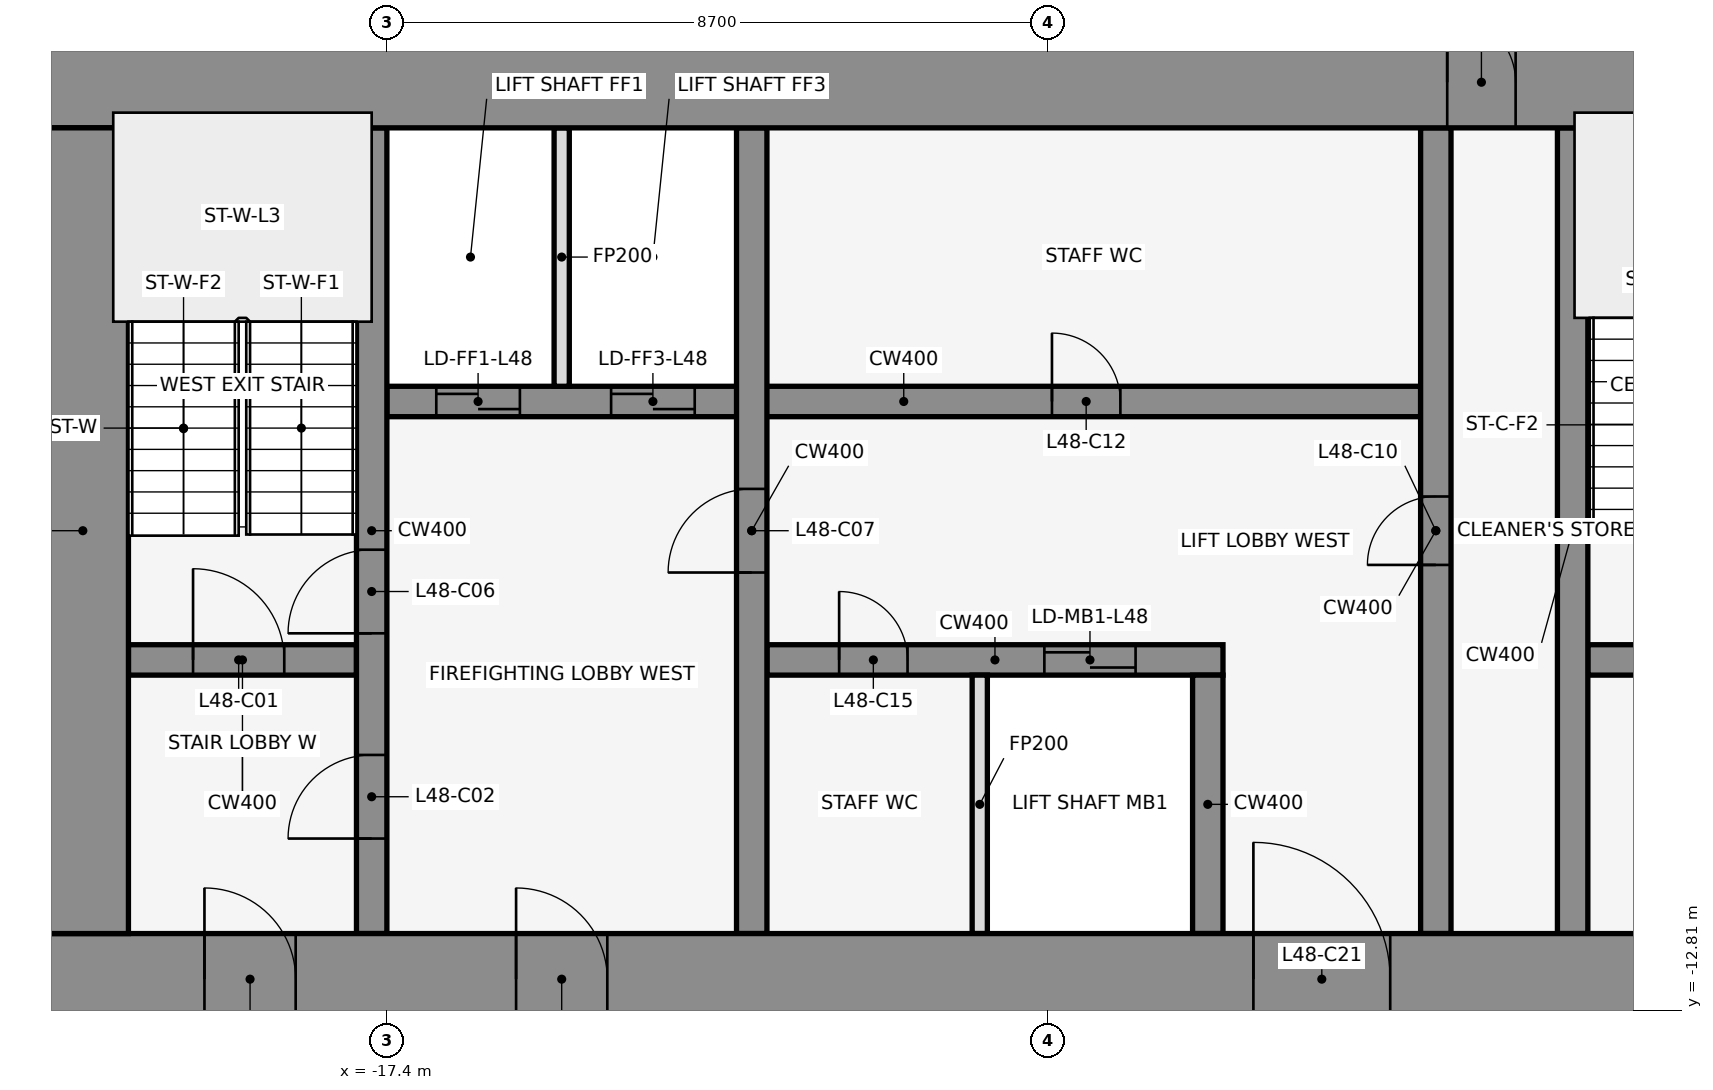
"""IFC4 building model, lengths in metres.
Left out: names, types, materials, properties, quantities, classifications, styles, units other than length and angle.
Written with IfcOpenShell. Run it as: python <this file> out.ifc"""

import sys

from ifc_helpers import new_model, si_unit, direction, frame, frame_2d, origin, place, context, subcontext, project, spatial, rectangle, extrude, element, fill, save


model = new_model("IFC4")
c1 = context("Model", 3, precision=1e-05, world=origin(), true_north=direction((0.0, 1.0)))
c2 = subcontext(c1, "Body", "Model", "MODEL_VIEW")
j1 = project(units=[si_unit("LENGTHUNIT", "METRE"), si_unit("PLANEANGLEUNIT", "RADIAN")], contexts=[c1])
p1 = place(None, origin())
s1 = spatial("IfcSite", under=j1, at=p1, CompositionType="ELEMENT")
p2 = place(p1, origin())
s2 = spatial("IfcBuilding", under=s1, at=p2, CompositionType="ELEMENT")
p3 = place(p2, frame((0.0, 0.0, 215.5)))
s3 = spatial("IfcBuildingStorey", under=s2, at=p3, CompositionType="ELEMENT", Elevation=215.5)
for number, where, z_axis, x_axis in (
    (1, (-0.068, -0.105, 0.0), (0.0, 0.0, 1.0), (-0.84, 0.543, 0.0)),
    (2, (-14.599, 1.08, 0.0), (0.0, 0.0, 1.0), (-0.84, -0.543, 0.0)),
):
    element("IfcWall", number, at=place(p3, frame(where, z_axis=z_axis, x_axis=x_axis)), inside=s3, PredefinedType="STANDARD", context=c2, shape_type="SweptSolid", body=[
        extrude(rectangle(XDim=2.183, YDim=0.25, at=frame_2d((1.091, 0.0))), origin(), (0.0, 0.0, 1.0), 3.95),
    ])
p4 = place(p3, frame((-20.8, -8.2, 0.0), z_axis=(0.0, 0.0, 1.0), x_axis=(1.0, 0.0, 0.0)))
e3 = element("IfcWall", 3, at=p4, inside=s3, PredefinedType="SHEAR", context=c2, shape_type="SweptSolid", body=[
    extrude(rectangle(XDim=3.0, YDim=0.4, at=frame_2d((1.5, 0.0))), origin(), (0.0, 0.0, 1.0), 4.1),
])
p5 = place(p4, frame((0.85, 0.0, 0.0)))
e4 = element("IfcOpeningElement", 4, at=p5, cuts=e3, PredefinedType="OPENING", context=c2, shape_type="SweptSolid", body=[
    extrude(rectangle(XDim=1.2, YDim=2.1, at=frame_2d((0.6, 1.05))), frame((0.0, 0.212, 0.0), z_axis=(0.0, -1.0, 0.0), x_axis=(1.0, 0.0, 0.0)), (0.0, 0.0, 1.0), 0.424),
])
p6 = place(p3, frame((-12.4, -8.2, 0.0), z_axis=(0.0, 0.0, 1.0), x_axis=(1.0, 0.0, 0.0)))
e5 = element("IfcWall", 5, at=p6, inside=s3, PredefinedType="SHEAR", context=c2, shape_type="SweptSolid", body=[
    extrude(rectangle(XDim=6.0, YDim=0.4, at=frame_2d((3.0, 0.0))), origin(), (0.0, 0.0, 1.0), 4.1),
])
p7 = place(p6, frame((3.65, 0.0, 0.0)))
e6 = element("IfcOpeningElement", 6, at=p7, cuts=e5, PredefinedType="OPENING", context=c2, shape_type="SweptSolid", body=[
    extrude(rectangle(XDim=1.2, YDim=2.1, at=frame_2d((0.6, 1.05))), frame((0.0, 0.212, 0.0), z_axis=(0.0, -1.0, 0.0), x_axis=(1.0, 0.0, 0.0)), (0.0, 0.0, 1.0), 0.424),
])
p8 = place(p6, frame((0.95, 0.0, 0.0)))
e7 = element("IfcOpeningElement", 7, at=p8, cuts=e5, PredefinedType="OPENING", context=c2, shape_type="SweptSolid", body=[
    extrude(rectangle(XDim=0.9, YDim=2.1, at=frame_2d((0.45, 1.05))), frame((0.0, 0.212, 0.0), z_axis=(0.0, -1.0, 0.0), x_axis=(1.0, 0.0, 0.0)), (0.0, 0.0, 1.0), 0.424),
])
p9 = place(p3, frame((-1.6, -8.2, 0.0), z_axis=(0.0, 0.0, 1.0), x_axis=(1.0, 0.0, 0.0)))
e8 = element("IfcWall", 8, at=p9, inside=s3, PredefinedType="SHEAR", context=c2, shape_type="SweptSolid", body=[
    extrude(rectangle(XDim=3.2, YDim=0.4, at=frame_2d((1.6, 0.0))), origin(), (0.0, 0.0, 1.0), 4.1),
])
p10 = place(p9, frame((1.05, 0.0, 0.0)))
e9 = element("IfcOpeningElement", 9, at=p10, cuts=e8, PredefinedType="OPENING", context=c2, shape_type="SweptSolid", body=[
    extrude(rectangle(XDim=1.2, YDim=2.1, at=frame_2d((0.6, 1.05))), frame((0.0, 0.212, 0.0), z_axis=(0.0, -1.0, 0.0), x_axis=(1.0, 0.0, 0.0)), (0.0, 0.0, 1.0), 0.424),
])
p11 = place(p3, frame((-17.4, -4.8, 0.0), z_axis=(0.0, 0.0, 1.0), x_axis=(1.0, 0.0, 0.0)))
e10 = element("IfcWall", 10, at=p11, inside=s3, PredefinedType="SHEAR", context=c2, shape_type="SweptSolid", body=[
    extrude(rectangle(XDim=13.6, YDim=0.4, at=frame_2d((6.8, 0.0))), origin(), (0.0, 0.0, 1.0), 4.1),
])
p12 = place(p11, frame((0.65, 0.0, 0.0)))
e11 = element("IfcOpeningElement", 11, at=p12, cuts=e10, PredefinedType="OPENING", context=c2, shape_type="SweptSolid", body=[
    extrude(rectangle(XDim=1.1, YDim=2.1, at=frame_2d((0.55, 1.05))), frame((0.0, 0.212, 0.0), z_axis=(0.0, -1.0, 0.0), x_axis=(1.0, 0.0, 0.0)), (0.0, 0.0, 1.0), 0.424),
])
p13 = place(p11, frame((2.95, 0.0, 0.0)))
e12 = element("IfcOpeningElement", 12, at=p13, cuts=e10, PredefinedType="OPENING", context=c2, shape_type="SweptSolid", body=[
    extrude(rectangle(XDim=1.1, YDim=2.1, at=frame_2d((0.55, 1.05))), frame((0.0, 0.212, 0.0), z_axis=(0.0, -1.0, 0.0), x_axis=(1.0, 0.0, 0.0)), (0.0, 0.0, 1.0), 0.424),
])
p14 = place(p11, frame((8.75, 0.0, 0.0)))
e13 = element("IfcOpeningElement", 13, at=p14, cuts=e10, PredefinedType="OPENING", context=c2, shape_type="SweptSolid", body=[
    extrude(rectangle(XDim=0.9, YDim=2.1, at=frame_2d((0.45, 1.05))), frame((0.0, 0.212, 0.0), z_axis=(0.0, -1.0, 0.0), x_axis=(1.0, 0.0, 0.0)), (0.0, 0.0, 1.0), 0.424),
])
p15 = place(p3, frame((-17.6, -11.8, 0.0), z_axis=(0.0, 0.0, 1.0), x_axis=(0.0, 1.0, 0.0)))
e14 = element("IfcWall", 14, at=p15, inside=s3, PredefinedType="SHEAR", context=c2, shape_type="SweptSolid", body=[
    extrude(rectangle(XDim=10.6, YDim=0.4, at=frame_2d((5.3, 0.0))), origin(), (0.0, 0.0, 1.0), 4.1),
])
p16 = place(p15, frame((1.25, 0.0, 0.0)))
e15 = element("IfcOpeningElement", 15, at=p16, cuts=e14, PredefinedType="OPENING", context=c2, shape_type="SweptSolid", body=[
    extrude(rectangle(XDim=1.1, YDim=2.1, at=frame_2d((0.55, 1.05))), frame((0.0, 0.212, 0.0), z_axis=(0.0, -1.0, 0.0), x_axis=(1.0, 0.0, 0.0)), (0.0, 0.0, 1.0), 0.424),
])
p17 = place(p15, frame((3.95, 0.0, 0.0)))
e16 = element("IfcOpeningElement", 16, at=p17, cuts=e14, PredefinedType="OPENING", context=c2, shape_type="SweptSolid", body=[
    extrude(rectangle(XDim=1.1, YDim=2.1, at=frame_2d((0.55, 1.05))), frame((0.0, 0.212, 0.0), z_axis=(0.0, -1.0, 0.0), x_axis=(1.0, 0.0, 0.0)), (0.0, 0.0, 1.0), 0.424),
])
p18 = place(p3, frame((-15.1, -4.6, 0.0), z_axis=(0.0, 0.0, 1.0), x_axis=(0.0, 1.0, 0.0)))
e17 = element("IfcWall", 17, at=p18, inside=s3, PredefinedType="PARTITIONING", context=c2, shape_type="SweptSolid", body=[
    extrude(rectangle(XDim=3.4, YDim=0.2, at=frame_2d((1.7, 0.0))), origin(), (0.0, 0.0, 1.0), 2.84),
])
p19 = place(p3, frame((-12.6, -11.8, 0.0), z_axis=(0.0, 0.0, 1.0), x_axis=(0.0, 1.0, 0.0)))
e18 = element("IfcWall", 18, at=p19, inside=s3, PredefinedType="SHEAR", context=c2, shape_type="SweptSolid", body=[
    extrude(rectangle(XDim=10.6, YDim=0.4, at=frame_2d((5.3, 0.0))), origin(), (0.0, 0.0, 1.0), 4.1),
])
p20 = place(p19, frame((4.75, 0.0, 0.0)))
e19 = element("IfcOpeningElement", 19, at=p20, cuts=e18, PredefinedType="OPENING", context=c2, shape_type="SweptSolid", body=[
    extrude(rectangle(XDim=1.1, YDim=2.1, at=frame_2d((0.55, 1.05))), frame((0.0, 0.212, 0.0), z_axis=(0.0, -1.0, 0.0), x_axis=(1.0, 0.0, 0.0)), (0.0, 0.0, 1.0), 0.424),
])
p21 = place(p3, frame((-9.6, -11.8, 0.0), z_axis=(0.0, 0.0, 1.0), x_axis=(0.0, 1.0, 0.0)))
e20 = element("IfcWall", 20, at=p21, inside=s3, PredefinedType="PARTITIONING", context=c2, shape_type="SweptSolid", body=[
    extrude(rectangle(XDim=3.4, YDim=0.2, at=frame_2d((1.7, 0.0))), origin(), (0.0, 0.0, 1.0), 2.84),
])
p22 = place(p3, frame((-6.6, -11.8, 0.0), z_axis=(0.0, 0.0, 1.0), x_axis=(0.0, 1.0, 0.0)))
e21 = element("IfcWall", 21, at=p22, inside=s3, PredefinedType="SHEAR", context=c2, shape_type="SweptSolid", body=[
    extrude(rectangle(XDim=3.4, YDim=0.4, at=frame_2d((1.7, 0.0))), origin(), (0.0, 0.0, 1.0), 4.1),
])
p23 = place(p3, frame((-3.6, -11.8, 0.0), z_axis=(0.0, 0.0, 1.0), x_axis=(0.0, 1.0, 0.0)))
e22 = element("IfcWall", 22, at=p23, inside=s3, PredefinedType="SHEAR", context=c2, shape_type="SweptSolid", body=[
    extrude(rectangle(XDim=10.6, YDim=0.4, at=frame_2d((5.3, 0.0))), origin(), (0.0, 0.0, 1.0), 4.1),
])
p24 = place(p23, frame((4.85, 0.0, 0.0)))
e23 = element("IfcOpeningElement", 23, at=p24, cuts=e22, PredefinedType="OPENING", context=c2, shape_type="SweptSolid", body=[
    extrude(rectangle(XDim=0.9, YDim=2.1, at=frame_2d((0.45, 1.05))), frame((0.0, 0.212, 0.0), z_axis=(0.0, -1.0, 0.0), x_axis=(1.0, 0.0, 0.0)), (0.0, 0.0, 1.0), 0.424),
])
p25 = place(p3, frame((-1.8, -11.8, 0.0), z_axis=(0.0, 0.0, 1.0), x_axis=(0.0, 1.0, 0.0)))
e24 = element("IfcWall", 24, at=p25, inside=s3, PredefinedType="SHEAR", context=c2, shape_type="SweptSolid", body=[
    extrude(rectangle(XDim=10.6, YDim=0.4, at=frame_2d((5.3, 0.0))), origin(), (0.0, 0.0, 1.0), 4.1),
])
p26 = place(p3, frame((-22.0, -0.6, 0.0), z_axis=(0.0, 0.0, 1.0), x_axis=(1.0, 0.0, 0.0)))
e25 = element("IfcWall", 25, at=p26, inside=s3, PredefinedType="SHEAR", context=c2, shape_type="SweptSolid", body=[
    extrude(rectangle(XDim=44.0, YDim=1.2, at=frame_2d((22.0, 0.0))), origin(), (0.0, 0.0, 1.0), 4.1),
])
p27 = place(p26, frame((18.55, 0.0, 0.0)))
e26 = element("IfcOpeningElement", 26, at=p27, cuts=e25, PredefinedType="OPENING", context=c2, shape_type="SweptSolid", body=[
    extrude(rectangle(XDim=0.9, YDim=2.1, at=frame_2d((0.45, 1.05))), frame((0.0, 0.612, 0.0), z_axis=(0.0, -1.0, 0.0), x_axis=(1.0, 0.0, 0.0)), (0.0, 0.0, 1.0), 1.224),
])
p28 = place(p26, frame((24.55, 0.0, 0.0)))
e27 = element("IfcOpeningElement", 27, at=p28, cuts=e25, PredefinedType="OPENING", context=c2, shape_type="SweptSolid", body=[
    extrude(rectangle(XDim=0.9, YDim=2.1, at=frame_2d((0.45, 1.05))), frame((0.0, 0.612, 0.0), z_axis=(0.0, -1.0, 0.0), x_axis=(1.0, 0.0, 0.0)), (0.0, 0.0, 1.0), 1.224),
])
p29 = place(p3, frame((-22.0, -12.4, 0.0), z_axis=(0.0, 0.0, 1.0), x_axis=(1.0, 0.0, 0.0)))
e28 = element("IfcWall", 28, at=p29, inside=s3, PredefinedType="SHEAR", context=c2, shape_type="SweptSolid", body=[
    extrude(rectangle(XDim=44.0, YDim=1.2, at=frame_2d((22.0, 0.0))), origin(), (0.0, 0.0, 1.0), 4.1),
])
p30 = place(p29, frame((2.2, 0.0, 0.0)))
e29 = element("IfcOpeningElement", 29, at=p30, cuts=e28, PredefinedType="OPENING", context=c2, shape_type="SweptSolid", body=[
    extrude(rectangle(XDim=1.2, YDim=2.1, at=frame_2d((0.6, 1.05))), frame((0.0, 0.612, 0.0), z_axis=(0.0, -1.0, 0.0), x_axis=(1.0, 0.0, 0.0)), (0.0, 0.0, 1.0), 1.224),
])
p31 = place(p29, frame((21.4, 0.0, 0.0)))
e30 = element("IfcOpeningElement", 30, at=p31, cuts=e28, PredefinedType="OPENING", context=c2, shape_type="SweptSolid", body=[
    extrude(rectangle(XDim=1.2, YDim=2.1, at=frame_2d((0.6, 1.05))), frame((0.0, 0.612, 0.0), z_axis=(0.0, -1.0, 0.0), x_axis=(1.0, 0.0, 0.0)), (0.0, 0.0, 1.0), 1.224),
])
p32 = place(p29, frame((40.6, 0.0, 0.0)))
e31 = element("IfcOpeningElement", 31, at=p32, cuts=e28, PredefinedType="OPENING", context=c2, shape_type="SweptSolid", body=[
    extrude(rectangle(XDim=1.2, YDim=2.1, at=frame_2d((0.6, 1.05))), frame((0.0, 0.612, 0.0), z_axis=(0.0, -1.0, 0.0), x_axis=(1.0, 0.0, 0.0)), (0.0, 0.0, 1.0), 1.224),
])
p33 = place(p29, frame((16.0, 0.0, 0.0)))
e32 = element("IfcOpeningElement", 32, at=p33, cuts=e28, PredefinedType="OPENING", context=c2, shape_type="SweptSolid", body=[
    extrude(rectangle(XDim=1.8, YDim=2.1, at=frame_2d((0.9, 1.05))), frame((0.0, 0.612, 0.0), z_axis=(0.0, -1.0, 0.0), x_axis=(1.0, 0.0, 0.0)), (0.0, 0.0, 1.0), 1.224),
])
p34 = place(p29, frame((6.3, 0.0, 0.0)))
e33 = element("IfcOpeningElement", 33, at=p34, cuts=e28, PredefinedType="OPENING", context=c2, shape_type="SweptSolid", body=[
    extrude(rectangle(XDim=1.2, YDim=2.1, at=frame_2d((0.6, 1.05))), frame((0.0, 0.612, 0.0), z_axis=(0.0, -1.0, 0.0), x_axis=(1.0, 0.0, 0.0)), (0.0, 0.0, 1.0), 1.224),
])
p35 = place(p29, frame((26.2, 0.0, 0.0)))
e34 = element("IfcOpeningElement", 34, at=p35, cuts=e28, PredefinedType="OPENING", context=c2, shape_type="SweptSolid", body=[
    extrude(rectangle(XDim=1.8, YDim=2.1, at=frame_2d((0.9, 1.05))), frame((0.0, 0.612, 0.0), z_axis=(0.0, -1.0, 0.0), x_axis=(1.0, 0.0, 0.0)), (0.0, 0.0, 1.0), 1.224),
])
p36 = place(p29, frame((36.5, 0.0, 0.0)))
e35 = element("IfcOpeningElement", 35, at=p36, cuts=e28, PredefinedType="OPENING", context=c2, shape_type="SweptSolid", body=[
    extrude(rectangle(XDim=1.2, YDim=2.1, at=frame_2d((0.6, 1.05))), frame((0.0, 0.612, 0.0), z_axis=(0.0, -1.0, 0.0), x_axis=(1.0, 0.0, 0.0)), (0.0, 0.0, 1.0), 1.224),
])
p37 = place(p3, frame((-21.4, -11.8, 0.0), z_axis=(0.0, 0.0, 1.0), x_axis=(0.0, 1.0, 0.0)))
e36 = element("IfcWall", 36, at=p37, inside=s3, PredefinedType="SHEAR", context=c2, shape_type="SweptSolid", body=[
    extrude(rectangle(XDim=10.6, YDim=1.2, at=frame_2d((5.3, 0.0))), origin(), (0.0, 0.0, 1.0), 4.1),
])
p38 = place(p5, origin())
e37 = element("IfcDoor", 37, at=p38, inside=s3, OperationType="SINGLE_SWING_LEFT", PredefinedType="DOOR", context=c2, shape_type="SweptSolid", body=[
    extrude(rectangle(XDim=1.2, YDim=2.1, at=frame_2d((0.6, 1.05))), frame((0.0, 0.025, 0.0), z_axis=(0.0, -1.0, 0.0), x_axis=(1.0, 0.0, 0.0)), (0.0, 0.0, 1.0), 0.05),
])
fill(e4, e37)
p39 = place(p16, frame((1.1, 0.0, 0.0), z_axis=(0.0, 0.0, 1.0), x_axis=(-1.0, 0.0, 0.0)))
e38 = element("IfcDoor", 38, at=p39, inside=s3, OperationType="SINGLE_SWING_LEFT", PredefinedType="DOOR", context=c2, shape_type="SweptSolid", body=[
    extrude(rectangle(XDim=1.1, YDim=2.1, at=frame_2d((0.55, 1.05))), frame((0.0, 0.025, 0.0), z_axis=(0.0, -1.0, 0.0), x_axis=(1.0, 0.0, 0.0)), (0.0, 0.0, 1.0), 0.05),
])
fill(e15, e38)
p40 = place(p12, origin())
e39 = element("IfcDoor", 39, at=p40, inside=s3, OperationType="DOUBLE_DOOR_SLIDING", PredefinedType="DOOR", context=c2, shape_type="SweptSolid", body=[
    extrude(rectangle(XDim=1.1, YDim=2.1, at=frame_2d((0.55, 1.05))), frame((0.0, 0.025, 0.0), z_axis=(0.0, -1.0, 0.0), x_axis=(1.0, 0.0, 0.0)), (0.0, 0.0, 1.0), 0.05),
])
fill(e11, e39)
p41 = place(p13, origin())
e40 = element("IfcDoor", 40, at=p41, inside=s3, OperationType="DOUBLE_DOOR_SLIDING", PredefinedType="DOOR", context=c2, shape_type="SweptSolid", body=[
    extrude(rectangle(XDim=1.1, YDim=2.1, at=frame_2d((0.55, 1.05))), frame((0.0, 0.025, 0.0), z_axis=(0.0, -1.0, 0.0), x_axis=(1.0, 0.0, 0.0)), (0.0, 0.0, 1.0), 0.05),
])
fill(e12, e40)
p42 = place(p7, origin())
e41 = element("IfcDoor", 41, at=p42, inside=s3, OperationType="DOUBLE_DOOR_SLIDING", PredefinedType="DOOR", context=c2, shape_type="SweptSolid", body=[
    extrude(rectangle(XDim=1.2, YDim=2.1, at=frame_2d((0.6, 1.05))), frame((0.0, 0.025, 0.0), z_axis=(0.0, -1.0, 0.0), x_axis=(1.0, 0.0, 0.0)), (0.0, 0.0, 1.0), 0.05),
])
fill(e6, e41)
p43 = place(p17, frame((1.1, 0.0, 0.0), z_axis=(0.0, 0.0, 1.0), x_axis=(-1.0, 0.0, 0.0)))
e42 = element("IfcDoor", 42, at=p43, inside=s3, OperationType="SINGLE_SWING_LEFT", PredefinedType="DOOR", context=c2, shape_type="SweptSolid", body=[
    extrude(rectangle(XDim=1.1, YDim=2.1, at=frame_2d((0.55, 1.05))), frame((0.0, 0.025, 0.0), z_axis=(0.0, -1.0, 0.0), x_axis=(1.0, 0.0, 0.0)), (0.0, 0.0, 1.0), 0.05),
])
fill(e16, e42)
p44 = place(p20, origin())
e43 = element("IfcDoor", 43, at=p44, inside=s3, OperationType="SINGLE_SWING_LEFT", PredefinedType="DOOR", context=c2, shape_type="SweptSolid", body=[
    extrude(rectangle(XDim=1.1, YDim=2.1, at=frame_2d((0.55, 1.05))), frame((0.0, 0.025, 0.0), z_axis=(0.0, -1.0, 0.0), x_axis=(1.0, 0.0, 0.0)), (0.0, 0.0, 1.0), 0.05),
])
fill(e19, e43)
p45 = place(p24, frame((0.9, 0.0, 0.0), z_axis=(0.0, 0.0, 1.0), x_axis=(-1.0, 0.0, 0.0)))
e44 = element("IfcDoor", 44, at=p45, inside=s3, OperationType="SINGLE_SWING_LEFT", PredefinedType="DOOR", context=c2, shape_type="SweptSolid", body=[
    extrude(rectangle(XDim=0.9, YDim=2.1, at=frame_2d((0.45, 1.05))), frame((0.0, 0.025, 0.0), z_axis=(0.0, -1.0, 0.0), x_axis=(1.0, 0.0, 0.0)), (0.0, 0.0, 1.0), 0.05),
])
fill(e23, e44)
p46 = place(p14, origin())
e45 = element("IfcDoor", 45, at=p46, inside=s3, OperationType="SINGLE_SWING_RIGHT", PredefinedType="DOOR", context=c2, shape_type="SweptSolid", body=[
    extrude(rectangle(XDim=0.9, YDim=2.1, at=frame_2d((0.45, 1.05))), frame((0.0, 0.025, 0.0), z_axis=(0.0, -1.0, 0.0), x_axis=(1.0, 0.0, 0.0)), (0.0, 0.0, 1.0), 0.05),
])
fill(e13, e45)
p47 = place(p8, frame((0.9, 0.0, 0.0), z_axis=(0.0, 0.0, 1.0), x_axis=(-1.0, 0.0, 0.0)))
e46 = element("IfcDoor", 46, at=p47, inside=s3, OperationType="SINGLE_SWING_RIGHT", PredefinedType="DOOR", context=c2, shape_type="SweptSolid", body=[
    extrude(rectangle(XDim=0.9, YDim=2.1, at=frame_2d((0.45, 1.05))), frame((0.0, 0.025, 0.0), z_axis=(0.0, -1.0, 0.0), x_axis=(1.0, 0.0, 0.0)), (0.0, 0.0, 1.0), 0.05),
])
fill(e7, e46)
p48 = place(p27, origin())
e47 = element("IfcDoor", 47, at=p48, inside=s3, OperationType="SINGLE_SWING_LEFT", PredefinedType="DOOR", context=c2, shape_type="SweptSolid", body=[
    extrude(rectangle(XDim=0.9, YDim=2.1, at=frame_2d((0.45, 1.05))), frame((0.0, 0.025, 0.0), z_axis=(0.0, -1.0, 0.0), x_axis=(1.0, 0.0, 0.0)), (0.0, 0.0, 1.0), 0.05),
])
fill(e26, e47)
p49 = place(p30, frame((1.2, 0.0, 0.0), z_axis=(0.0, 0.0, 1.0), x_axis=(-1.0, 0.0, 0.0)))
e48 = element("IfcDoor", 48, at=p49, inside=s3, OperationType="SINGLE_SWING_RIGHT", PredefinedType="DOOR", context=c2, shape_type="SweptSolid", body=[
    extrude(rectangle(XDim=1.2, YDim=2.1, at=frame_2d((0.6, 1.05))), frame((0.0, 0.025, 0.0), z_axis=(0.0, -1.0, 0.0), x_axis=(1.0, 0.0, 0.0)), (0.0, 0.0, 1.0), 0.05),
])
fill(e29, e48)
p50 = place(p33, origin())
e49 = element("IfcDoor", 49, at=p50, inside=s3, OperationType="SINGLE_SWING_LEFT", PredefinedType="DOOR", context=c2, shape_type="SweptSolid", body=[
    extrude(rectangle(XDim=1.8, YDim=2.1, at=frame_2d((0.9, 1.05))), frame((0.0, 0.025, 0.0), z_axis=(0.0, -1.0, 0.0), x_axis=(1.0, 0.0, 0.0)), (0.0, 0.0, 1.0), 0.05),
])
fill(e32, e49)
p51 = place(p34, frame((1.2, 0.0, 0.0), z_axis=(0.0, 0.0, 1.0), x_axis=(-1.0, 0.0, 0.0)))
e50 = element("IfcDoor", 50, at=p51, inside=s3, OperationType="SINGLE_SWING_RIGHT", PredefinedType="DOOR", context=c2, shape_type="SweptSolid", body=[
    extrude(rectangle(XDim=1.2, YDim=2.1, at=frame_2d((0.6, 1.05))), frame((0.0, 0.025, 0.0), z_axis=(0.0, -1.0, 0.0), x_axis=(1.0, 0.0, 0.0)), (0.0, 0.0, 1.0), 0.05),
])
fill(e33, e50)
save(model, sys.argv[1])
